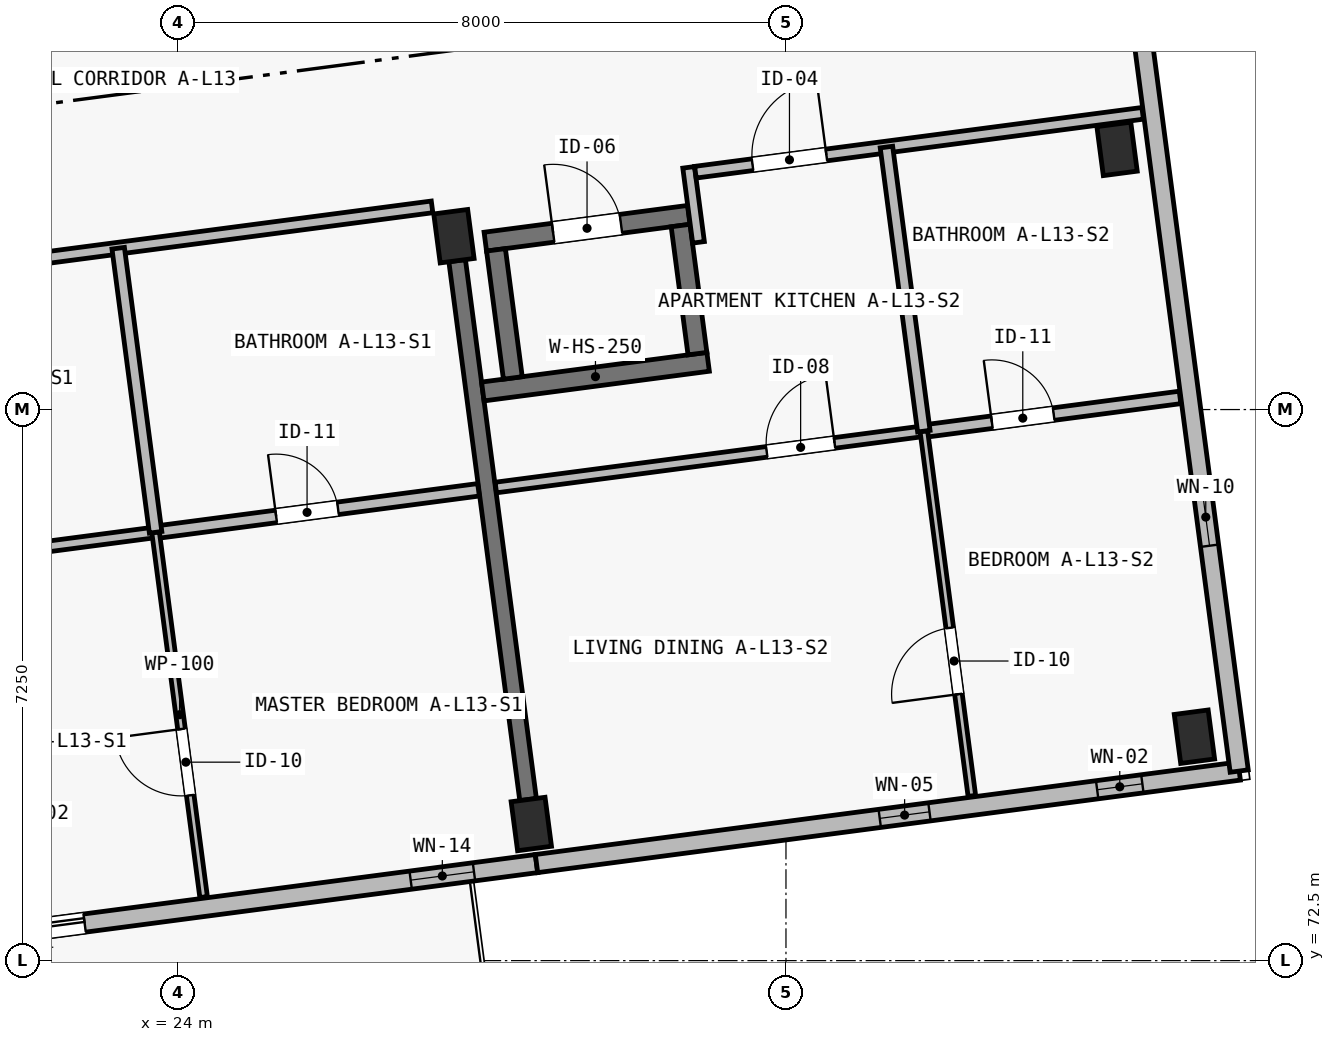
"""IFC4 building model, lengths in metres.
Left out: names, types, materials, properties, quantities, classifications, styles, units other than length and angle.
Written with IfcOpenShell. Run it as: python <this file> out.ifc"""

import sys

from ifc_helpers import new_model, si_unit, direction, frame, frame_2d, origin, origin_2d, place, context, subcontext, project, spatial, polyline, rectangle, outline, extrude, element, fill, save


model = new_model("IFC4")
c1 = context("Model", 3, precision=1e-05, world=origin(), true_north=direction((0.0, 1.0)))
c2 = subcontext(c1, "Body", "Model", "MODEL_VIEW")
j1 = project(units=[si_unit("LENGTHUNIT", "METRE"), si_unit("PLANEANGLEUNIT", "RADIAN")], contexts=[c1])
p1 = place(None, origin())
s1 = spatial("IfcSite", under=j1, at=p1, CompositionType="ELEMENT")
p2 = place(p1, origin())
s2 = spatial("IfcBuilding", under=s1, at=p2, CompositionType="ELEMENT")
p3 = place(p2, frame((0.0, 0.0, 44.15)))
s3 = spatial("IfcBuildingStorey", under=s2, at=p3, CompositionType="ELEMENT", Elevation=44.15)
for number, where, z_axis, x_axis in (
    (1, (28.649, 74.297, 0.0), (0.0, 0.0, 1.0), (0.991, 0.131, 0.0)),
    (2, (27.631, 82.031, 0.0), (0.0, 0.0, 1.0), (0.991, 0.131, 0.0)),
):
    element("IfcColumn", number, at=place(p3, frame(where, z_axis=z_axis, x_axis=x_axis)), inside=s3, PredefinedType="COLUMN", context=c2, shape_type="SweptSolid", body=[
        extrude(rectangle(XDim=0.45, YDim=0.65, at=origin_2d()), origin(), (0.0, 0.0, 1.0), 3.5),
    ])
for number, where, z_axis, x_axis in (
    (3, (37.374, 75.446, 0.0), (0.0, 0.0, 1.0), (0.991, 0.131, 0.0)),
    (4, (36.356, 83.179, 0.0), (0.0, 0.0, 1.0), (0.991, 0.131, 0.0)),
):
    element("IfcColumn", number, at=place(p3, frame(where, z_axis=z_axis, x_axis=x_axis)), inside=s3, PredefinedType="COLUMN", context=c2, shape_type="SweptSolid", body=[
        extrude(rectangle(XDim=0.45, YDim=0.65, at=origin_2d()), origin(), (0.0, 0.0, 1.0), 3.25),
    ])
p4 = place(p3, frame((28.607, 74.619, 0.0), z_axis=(0.0, 0.0, 1.0), x_axis=(-0.130503975686, 0.991447785983, 0.0)))
e5 = element("IfcWall", 5, at=p4, inside=s3, PredefinedType="SHEAR", context=c2, shape_type="SweptSolid", body=[
    extrude(rectangle(XDim=7.15, YDim=0.22, at=frame_2d((3.575, 0.0))), origin(), (0.0, 0.0, 1.0), 2.75),
])
p5 = place(p3, frame((28.011, 79.988, 0.0), z_axis=(0.0, 0.0, 1.0), x_axis=(0.991439837467, 0.130564346904, 0.0)))
e6 = element("IfcWall", 6, at=p5, inside=s3, PredefinedType="SHEAR", context=c2, shape_type="SweptSolid", body=[
    extrude(rectangle(XDim=2.99, YDim=0.25, at=frame_2d((1.495, 0.0))), origin(), (0.0, 0.0, 1.0), 3.5),
])
p6 = place(p3, frame((28.044, 81.959, 0.0), z_axis=(0.0, 0.0, 1.0), x_axis=(0.991439824936, 0.130564442062, 0.0)))
e7 = element("IfcWall", 7, at=p6, inside=s3, PredefinedType="SHEAR", context=c2, shape_type="SweptSolid", body=[
    extrude(rectangle(XDim=2.7, YDim=0.25, at=frame_2d((1.35, 0.0))), origin(), (0.0, 0.0, 1.0), 3.5),
])
p7 = place(p6, frame((0.9, 0.0, 0.0)))
e8 = element("IfcOpeningElement", 8, at=p7, cuts=e7, PredefinedType="OPENING", context=c2, shape_type="SweptSolid", body=[
    extrude(rectangle(XDim=0.9, YDim=2.05, at=frame_2d((0.45, 1.025))), frame((0.0, 0.14, 0.0), z_axis=(0.0, -1.0, 0.0), x_axis=(1.0, 0.0, 0.0)), (0.0, 0.0, 1.0), 0.28),
])
p8 = place(p3, frame((28.406, 80.166, 0.0), z_axis=(0.0, 0.0, 1.0), x_axis=(-0.130413643681, 0.991459672171, 0.0)))
e9 = element("IfcWall", 9, at=p8, inside=s3, PredefinedType="SHEAR", context=c2, shape_type="SweptSolid", body=[
    extrude(rectangle(XDim=1.7, YDim=0.25, at=frame_2d((0.85, 0.0))), origin(), (0.0, 0.0, 1.0), 3.5),
])
p9 = place(p3, frame((30.835, 80.486, 0.0), z_axis=(0.0, 0.0, 1.0), x_axis=(-0.1305548243, 0.991441091468, 0.0)))
e10 = element("IfcWall", 10, at=p9, inside=s3, PredefinedType="SHEAR", context=c2, shape_type="SweptSolid", body=[
    extrude(rectangle(XDim=1.7, YDim=0.25, at=frame_2d((0.85, 0.0))), origin(), (0.0, 0.0, 1.0), 3.5),
])
p10 = place(p3, frame((28.718, 73.777, 0.0), z_axis=(0.0, 0.0, 1.0), x_axis=(-0.991444377792, -0.130529865336, 0.0)))
e11 = element("IfcWall", 11, at=p10, inside=s3, PredefinedType="SOLIDWALL", context=c2, shape_type="SweptSolid", body=[
    extrude(outline(polyline([(0.0, 0.0), (8.8, 0.0), (8.8, 6.119), (0.0, 4.629), (0.0, 0.0)])), frame((0.0, 0.12, 0.0), z_axis=(0.0, -1.0, 0.0), x_axis=(1.0, 0.0, 0.0)), (0.0, 0.0, 1.0), 0.24),
])
p11 = place(p10, frame((5.997, 0.0, 0.0)))
e12 = element("IfcOpeningElement", 12, at=p11, cuts=e11, PredefinedType="OPENING", context=c2, shape_type="SweptSolid", body=[
    extrude(rectangle(XDim=1.8, YDim=2.12, at=frame_2d((0.9, 1.06))), frame((0.0, 0.135, 0.0), z_axis=(0.0, -1.0, 0.0), x_axis=(1.0, 0.0, 0.0)), (0.0, 0.0, 1.0), 0.27),
])
p12 = place(p10, frame((0.83, 0.0, 0.5)))
e13 = element("IfcOpeningElement", 13, at=p12, cuts=e11, PredefinedType="OPENING", context=c2, shape_type="SweptSolid", body=[
    extrude(rectangle(XDim=0.84, YDim=2.28, at=frame_2d((0.42, 1.14))), frame((0.0, 0.135, 0.0), z_axis=(0.0, -1.0, 0.0), x_axis=(1.0, 0.0, 0.0)), (0.0, 0.0, 1.0), 0.27),
])
p13 = place(p3, frame((37.963, 74.994, 0.0), z_axis=(0.0, 0.0, 1.0), x_axis=(-0.991446273426, -0.130515466173, 0.0)))
e14 = element("IfcWall", 14, at=p13, inside=s3, PredefinedType="SOLIDWALL", context=c2, shape_type="SweptSolid", body=[
    extrude(outline(polyline([(0.0, 0.0), (9.325, 0.0), (9.325, 4.629), (0.0, 3.051), (0.0, 0.0)])), frame((0.0, 0.12, 0.0), z_axis=(0.0, -1.0, 0.0), x_axis=(1.0, 0.0, 0.0)), (0.0, 0.0, 1.0), 0.24),
])
p14 = place(p13, frame((1.285, 0.0, 0.42)))
e15 = element("IfcOpeningElement", 15, at=p14, cuts=e14, PredefinedType="OPENING", context=c2, shape_type="SweptSolid", body=[
    extrude(rectangle(XDim=0.6, YDim=2.22, at=frame_2d((0.3, 1.11))), frame((0.0, 0.135, 0.0), z_axis=(0.0, -1.0, 0.0), x_axis=(1.0, 0.0, 0.0)), (0.0, 0.0, 1.0), 0.27),
])
p15 = place(p13, frame((4.11, 0.0, 0.42)))
e16 = element("IfcOpeningElement", 16, at=p15, cuts=e14, PredefinedType="OPENING", context=c2, shape_type="SweptSolid", body=[
    extrude(rectangle(XDim=0.66, YDim=2.32, at=frame_2d((0.33, 1.16))), frame((0.0, 0.135, 0.0), z_axis=(0.0, -1.0, 0.0), x_axis=(1.0, 0.0, 0.0)), (0.0, 0.0, 1.0), 0.27),
])
p16 = place(p3, frame((35.216, 95.864, 0.0), z_axis=(0.0, 0.0, 1.0), x_axis=(0.130525617048, -0.991444937097, 0.0)))
e17 = element("IfcWall", 17, at=p16, inside=s3, PredefinedType="SOLIDWALL", context=c2, shape_type="SweptSolid", body=[
    extrude(rectangle(XDim=21.05, YDim=0.24, at=frame_2d((10.525, 0.0))), origin(), (0.0, 0.0, 1.0), 3.051),
])
p17 = place(p16, frame((2.63, 0.0, 0.52)))
e18 = element("IfcOpeningElement", 18, at=p17, cuts=e17, PredefinedType="OPENING", context=c2, shape_type="SweptSolid", body=[
    extrude(rectangle(XDim=0.62, YDim=2.28, at=frame_2d((0.31, 1.14))), frame((0.0, 0.135, 0.0), z_axis=(0.0, -1.0, 0.0), x_axis=(1.0, 0.0, 0.0)), (0.0, 0.0, 1.0), 0.27),
])
p18 = place(p16, frame((17.3, 0.0, 0.45)))
e19 = element("IfcOpeningElement", 19, at=p18, cuts=e17, PredefinedType="OPENING", context=c2, shape_type="SweptSolid", body=[
    extrude(rectangle(XDim=0.76, YDim=2.34, at=frame_2d((0.38, 1.17))), frame((0.0, 0.135, 0.0), z_axis=(0.0, -1.0, 0.0), x_axis=(1.0, 0.0, 0.0)), (0.0, 0.0, 1.0), 0.27),
])
p19 = place(p3, frame((19.085, 81.329, 0.0), z_axis=(0.0, 0.0, 1.0), x_axis=(0.991446911972, 0.130510615437, 0.0)))
e20 = element("IfcWall", 20, at=p19, inside=s3, PredefinedType="PARTITIONING", context=c2, shape_type="SweptSolid", body=[
    extrude(rectangle(XDim=8.33, YDim=0.155, at=frame_2d((4.165, 0.0))), origin(), (0.0, 0.0, 1.0), 3.15),
])
p20 = place(p19, frame((1.655, 0.0, 0.0)))
e21 = element("IfcOpeningElement", 21, at=p20, cuts=e20, PredefinedType="OPENING", context=c2, shape_type="SweptSolid", body=[
    extrude(rectangle(XDim=0.98, YDim=2.15, at=frame_2d((0.49, 1.075))), frame((0.0, 0.093, 0.0), z_axis=(0.0, -1.0, 0.0), x_axis=(1.0, 0.0, 0.0)), (0.0, 0.0, 1.0), 0.185),
])
p21 = place(p3, frame((19.458, 77.576, 0.0), z_axis=(0.0, 0.0, 1.0), x_axis=(0.991451386343, 0.130476620581, 0.0)))
e22 = element("IfcWall", 22, at=p21, inside=s3, PredefinedType="PARTITIONING", context=c2, shape_type="SweptSolid", body=[
    extrude(rectangle(XDim=4.285, YDim=0.14, at=frame_2d((2.143, 0.0))), origin(), (0.0, 0.0, 1.0), 3.15),
])
p22 = place(p21, frame((1.825, 0.0, 0.0)))
e23 = element("IfcOpeningElement", 23, at=p22, cuts=e22, PredefinedType="OPENING", context=c2, shape_type="SweptSolid", body=[
    extrude(rectangle(XDim=0.9, YDim=2.1, at=frame_2d((0.45, 1.05))), frame((0.0, 0.085, 0.0), z_axis=(0.0, -1.0, 0.0), x_axis=(1.0, 0.0, 0.0)), (0.0, 0.0, 1.0), 0.17),
])
p23 = place(p3, frame((23.706, 78.135, 0.0), z_axis=(0.0, 0.0, 1.0), x_axis=(0.991444014242, 0.130532626667, 0.0)))
e24 = element("IfcWall", 24, at=p23, inside=s3, PredefinedType="PLUMBINGWALL", context=c2, shape_type="SweptSolid", body=[
    extrude(rectangle(XDim=4.285, YDim=0.165, at=frame_2d((2.143, 0.0))), origin(), (0.0, 0.0, 1.0), 3.15),
])
p24 = place(p23, frame((1.6, 0.0, 0.0)))
e25 = element("IfcOpeningElement", 25, at=p24, cuts=e24, PredefinedType="OPENING", context=c2, shape_type="SweptSolid", body=[
    extrude(rectangle(XDim=0.82, YDim=2.08, at=frame_2d((0.41, 1.04))), frame((0.0, 0.097, 0.0), z_axis=(0.0, -1.0, 0.0), x_axis=(1.0, 0.0, 0.0)), (0.0, 0.0, 1.0), 0.195),
])
p25 = place(p3, frame((24.338, 73.336, 0.0), z_axis=(0.0, 0.0, 1.0), x_axis=(-0.130494962676, 0.991448972321, 0.0)))
e26 = element("IfcWall", 26, at=p25, inside=s3, PredefinedType="PARTITIONING", context=c2, shape_type="SweptSolid", body=[
    extrude(rectangle(XDim=4.84, YDim=0.1, at=frame_2d((2.42, 0.0))), origin(), (0.0, 0.0, 1.0), 3.15),
])
p26 = place(p25, frame((1.35, 0.0, 0.0)))
e27 = element("IfcOpeningElement", 27, at=p26, cuts=e26, PredefinedType="OPENING", context=c2, shape_type="SweptSolid", body=[
    extrude(rectangle(XDim=0.88, YDim=2.1, at=frame_2d((0.44, 1.05))), frame((0.0, 0.065, 0.0), z_axis=(0.0, -1.0, 0.0), x_axis=(1.0, 0.0, 0.0)), (0.0, 0.0, 1.0), 0.13),
])
p27 = place(p3, frame((23.706, 78.135, 0.0), z_axis=(0.0, 0.0, 1.0), x_axis=(-0.130551670646, 0.991441506742, 0.0)))
e28 = element("IfcWall", 28, at=p27, inside=s3, PredefinedType="PLUMBINGWALL", context=c2, shape_type="SweptSolid", body=[
    extrude(rectangle(XDim=3.77, YDim=0.165, at=frame_2d((1.885, 0.0))), origin(), (0.0, 0.0, 1.0), 3.15),
])
p28 = place(p3, frame((30.849, 81.95, 0.0), z_axis=(0.0, 0.0, 1.0), x_axis=(-0.13055608231, 0.99144092581, 0.0)))
e29 = element("IfcWall", 29, at=p28, inside=s3, PredefinedType="PARTITIONING", context=c2, shape_type="SweptSolid", body=[
    extrude(rectangle(XDim=0.995, YDim=0.155, at=frame_2d((0.498, 0.0))), origin(), (0.0, 0.0, 1.0), 3.085),
])
p29 = place(p3, frame((30.809, 82.873, 0.0), z_axis=(0.0, 0.0, 1.0), x_axis=(0.991445332464, 0.130522613887, 0.0)))
e30 = element("IfcWall", 30, at=p29, inside=s3, PredefinedType="PARTITIONING", context=c2, shape_type="SweptSolid", body=[
    extrude(rectangle(XDim=5.935, YDim=0.155, at=frame_2d((2.968, 0.0))), origin(), (0.0, 0.0, 1.0), 3.085),
])
p30 = place(p29, frame((0.758, 0.0, 0.0)))
e31 = element("IfcOpeningElement", 31, at=p30, cuts=e30, PredefinedType="OPENING", context=c2, shape_type="SweptSolid", body=[
    extrude(rectangle(XDim=0.98, YDim=2.15, at=frame_2d((0.49, 1.075))), frame((0.0, 0.093, 0.0), z_axis=(0.0, -1.0, 0.0), x_axis=(1.0, 0.0, 0.0)), (0.0, 0.0, 1.0), 0.185),
])
p31 = place(p3, frame((28.183, 78.724, 0.0), z_axis=(0.0, 0.0, 1.0), x_axis=(0.991443173156, 0.130539014865, 0.0)))
e32 = element("IfcWall", 32, at=p31, inside=s3, PredefinedType="PARTITIONING", context=c2, shape_type="SweptSolid", body=[
    extrude(rectangle(XDim=5.68, YDim=0.14, at=frame_2d((2.84, 0.0))), origin(), (0.0, 0.0, 1.0), 3.085),
])
p32 = place(p31, frame((3.595, 0.0, 0.0)))
e33 = element("IfcOpeningElement", 33, at=p32, cuts=e32, PredefinedType="OPENING", context=c2, shape_type="SweptSolid", body=[
    extrude(rectangle(XDim=0.9, YDim=2.1, at=frame_2d((0.45, 1.05))), frame((0.0, 0.085, 0.0), z_axis=(0.0, -1.0, 0.0), x_axis=(1.0, 0.0, 0.0)), (0.0, 0.0, 1.0), 0.17),
])
p33 = place(p3, frame((33.814, 79.466, 0.0), z_axis=(0.0, 0.0, 1.0), x_axis=(0.991442315347, 0.130545529753, 0.0)))
e34 = element("IfcWall", 34, at=p33, inside=s3, PredefinedType="PLUMBINGWALL", context=c2, shape_type="SweptSolid", body=[
    extrude(rectangle(XDim=3.4, YDim=0.165, at=frame_2d((1.7, 0.0))), origin(), (0.0, 0.0, 1.0), 3.085),
])
p34 = place(p33, frame((0.903, 0.0, 0.0)))
e35 = element("IfcOpeningElement", 35, at=p34, cuts=e34, PredefinedType="OPENING", context=c2, shape_type="SweptSolid", body=[
    extrude(rectangle(XDim=0.82, YDim=2.08, at=frame_2d((0.41, 1.04))), frame((0.0, 0.097, 0.0), z_axis=(0.0, -1.0, 0.0), x_axis=(1.0, 0.0, 0.0)), (0.0, 0.0, 1.0), 0.195),
])
p35 = place(p3, frame((34.446, 74.667, 0.0), z_axis=(0.0, 0.0, 1.0), x_axis=(-0.130544545786, 0.991442444908, 0.0)))
e36 = element("IfcWall", 36, at=p35, inside=s3, PredefinedType="PARTITIONING", context=c2, shape_type="SweptSolid", body=[
    extrude(rectangle(XDim=4.84, YDim=0.1, at=frame_2d((2.42, 0.0))), origin(), (0.0, 0.0, 1.0), 3.085),
])
p36 = place(p35, frame((1.35, 0.0, 0.0)))
e37 = element("IfcOpeningElement", 37, at=p36, cuts=e36, PredefinedType="OPENING", context=c2, shape_type="SweptSolid", body=[
    extrude(rectangle(XDim=0.88, YDim=2.1, at=frame_2d((0.44, 1.05))), frame((0.0, 0.065, 0.0), z_axis=(0.0, -1.0, 0.0), x_axis=(1.0, 0.0, 0.0)), (0.0, 0.0, 1.0), 0.13),
])
p37 = place(p3, frame((33.814, 79.466, 0.0), z_axis=(0.0, 0.0, 1.0), x_axis=(-0.13048801578, 0.99144988665, 0.0)))
e38 = element("IfcWall", 38, at=p37, inside=s3, PredefinedType="PLUMBINGWALL", context=c2, shape_type="SweptSolid", body=[
    extrude(rectangle(XDim=3.77, YDim=0.165, at=frame_2d((1.885, 0.0))), origin(), (0.0, 0.0, 1.0), 3.085),
])
p38 = place(p11, origin())
e39 = element("IfcDoor", 39, at=p38, inside=s3, OperationType="SLIDING_TO_LEFT", PredefinedType="DOOR", context=c2, shape_type="SweptSolid", body=[
    extrude(rectangle(XDim=1.8, YDim=2.12, at=frame_2d((0.9, 1.06))), frame((0.0, 0.025, 0.0), z_axis=(0.0, -1.0, 0.0), x_axis=(1.0, 0.0, 0.0)), (0.0, 0.0, 1.0), 0.05),
])
fill(e12, e39)
p39 = place(p12, origin())
e40 = element("IfcWindow", 40, at=p39, inside=s3, PartitioningType="SINGLE_PANEL", PredefinedType="WINDOW", context=c2, shape_type="SweptSolid", body=[
    extrude(rectangle(XDim=0.84, YDim=2.28, at=frame_2d((0.42, 1.14))), frame((0.0, 0.03, 0.0), z_axis=(0.0, -1.0, 0.0), x_axis=(1.0, 0.0, 0.0)), (0.0, 0.0, 1.0), 0.06),
])
fill(e13, e40)
p40 = place(p14, origin())
e41 = element("IfcWindow", 41, at=p40, inside=s3, PartitioningType="SINGLE_PANEL", PredefinedType="WINDOW", context=c2, shape_type="SweptSolid", body=[
    extrude(rectangle(XDim=0.6, YDim=2.22, at=frame_2d((0.3, 1.11))), frame((0.0, 0.03, 0.0), z_axis=(0.0, -1.0, 0.0), x_axis=(1.0, 0.0, 0.0)), (0.0, 0.0, 1.0), 0.06),
])
fill(e15, e41)
p41 = place(p15, origin())
e42 = element("IfcWindow", 42, at=p41, inside=s3, PartitioningType="SINGLE_PANEL", PredefinedType="WINDOW", context=c2, shape_type="SweptSolid", body=[
    extrude(rectangle(XDim=0.66, YDim=2.32, at=frame_2d((0.33, 1.16))), frame((0.0, 0.03, 0.0), z_axis=(0.0, -1.0, 0.0), x_axis=(1.0, 0.0, 0.0)), (0.0, 0.0, 1.0), 0.06),
])
fill(e16, e42)
p42 = place(p18, origin())
e43 = element("IfcWindow", 43, at=p42, inside=s3, PartitioningType="SINGLE_PANEL", PredefinedType="WINDOW", context=c2, shape_type="SweptSolid", body=[
    extrude(rectangle(XDim=0.76, YDim=2.34, at=frame_2d((0.38, 1.17))), frame((0.0, 0.03, 0.0), z_axis=(0.0, -1.0, 0.0), x_axis=(1.0, 0.0, 0.0)), (0.0, 0.0, 1.0), 0.06),
])
fill(e19, e43)
p43 = place(p24, origin())
e44 = element("IfcDoor", 44, at=p43, inside=s3, OperationType="SINGLE_SWING_LEFT", PredefinedType="DOOR", context=c2, shape_type="SweptSolid", body=[
    extrude(rectangle(XDim=0.82, YDim=2.08, at=frame_2d((0.41, 1.04))), frame((0.0, 0.025, 0.0), z_axis=(0.0, -1.0, 0.0), x_axis=(1.0, 0.0, 0.0)), (0.0, 0.0, 1.0), 0.05),
])
fill(e25, e44)
p44 = place(p26, origin())
e45 = element("IfcDoor", 45, at=p44, inside=s3, OperationType="SINGLE_SWING_RIGHT", PredefinedType="DOOR", context=c2, shape_type="SweptSolid", body=[
    extrude(rectangle(XDim=0.88, YDim=2.1, at=frame_2d((0.44, 1.05))), frame((0.0, 0.025, 0.0), z_axis=(0.0, -1.0, 0.0), x_axis=(1.0, 0.0, 0.0)), (0.0, 0.0, 1.0), 0.05),
])
fill(e27, e45)
p45 = place(p30, origin())
e46 = element("IfcDoor", 46, at=p45, inside=s3, OperationType="SINGLE_SWING_RIGHT", PredefinedType="DOOR", context=c2, shape_type="SweptSolid", body=[
    extrude(rectangle(XDim=0.98, YDim=2.15, at=frame_2d((0.49, 1.075))), frame((0.0, 0.025, 0.0), z_axis=(0.0, -1.0, 0.0), x_axis=(1.0, 0.0, 0.0)), (0.0, 0.0, 1.0), 0.05),
])
fill(e31, e46)
p46 = place(p32, origin())
e47 = element("IfcDoor", 47, at=p46, inside=s3, OperationType="SINGLE_SWING_RIGHT", PredefinedType="DOOR", context=c2, shape_type="SweptSolid", body=[
    extrude(rectangle(XDim=0.9, YDim=2.1, at=frame_2d((0.45, 1.05))), frame((0.0, 0.025, 0.0), z_axis=(0.0, -1.0, 0.0), x_axis=(1.0, 0.0, 0.0)), (0.0, 0.0, 1.0), 0.05),
])
fill(e33, e47)
p47 = place(p34, origin())
e48 = element("IfcDoor", 48, at=p47, inside=s3, OperationType="SINGLE_SWING_LEFT", PredefinedType="DOOR", context=c2, shape_type="SweptSolid", body=[
    extrude(rectangle(XDim=0.82, YDim=2.08, at=frame_2d((0.41, 1.04))), frame((0.0, 0.025, 0.0), z_axis=(0.0, -1.0, 0.0), x_axis=(1.0, 0.0, 0.0)), (0.0, 0.0, 1.0), 0.05),
])
fill(e35, e48)
p48 = place(p36, origin())
e49 = element("IfcDoor", 49, at=p48, inside=s3, OperationType="SINGLE_SWING_LEFT", PredefinedType="DOOR", context=c2, shape_type="SweptSolid", body=[
    extrude(rectangle(XDim=0.88, YDim=2.1, at=frame_2d((0.44, 1.05))), frame((0.0, 0.025, 0.0), z_axis=(0.0, -1.0, 0.0), x_axis=(1.0, 0.0, 0.0)), (0.0, 0.0, 1.0), 0.05),
])
fill(e37, e49)
p49 = place(p7, origin())
e50 = element("IfcDoor", 50, at=p49, inside=s3, OperationType="SINGLE_SWING_LEFT", PredefinedType="DOOR", context=c2, shape_type="SweptSolid", body=[
    extrude(rectangle(XDim=0.9, YDim=2.05, at=frame_2d((0.45, 1.025))), frame((0.0, 0.025, 0.0), z_axis=(0.0, -1.0, 0.0), x_axis=(1.0, 0.0, 0.0)), (0.0, 0.0, 1.0), 0.05),
])
fill(e8, e50)
save(model, sys.argv[1])
